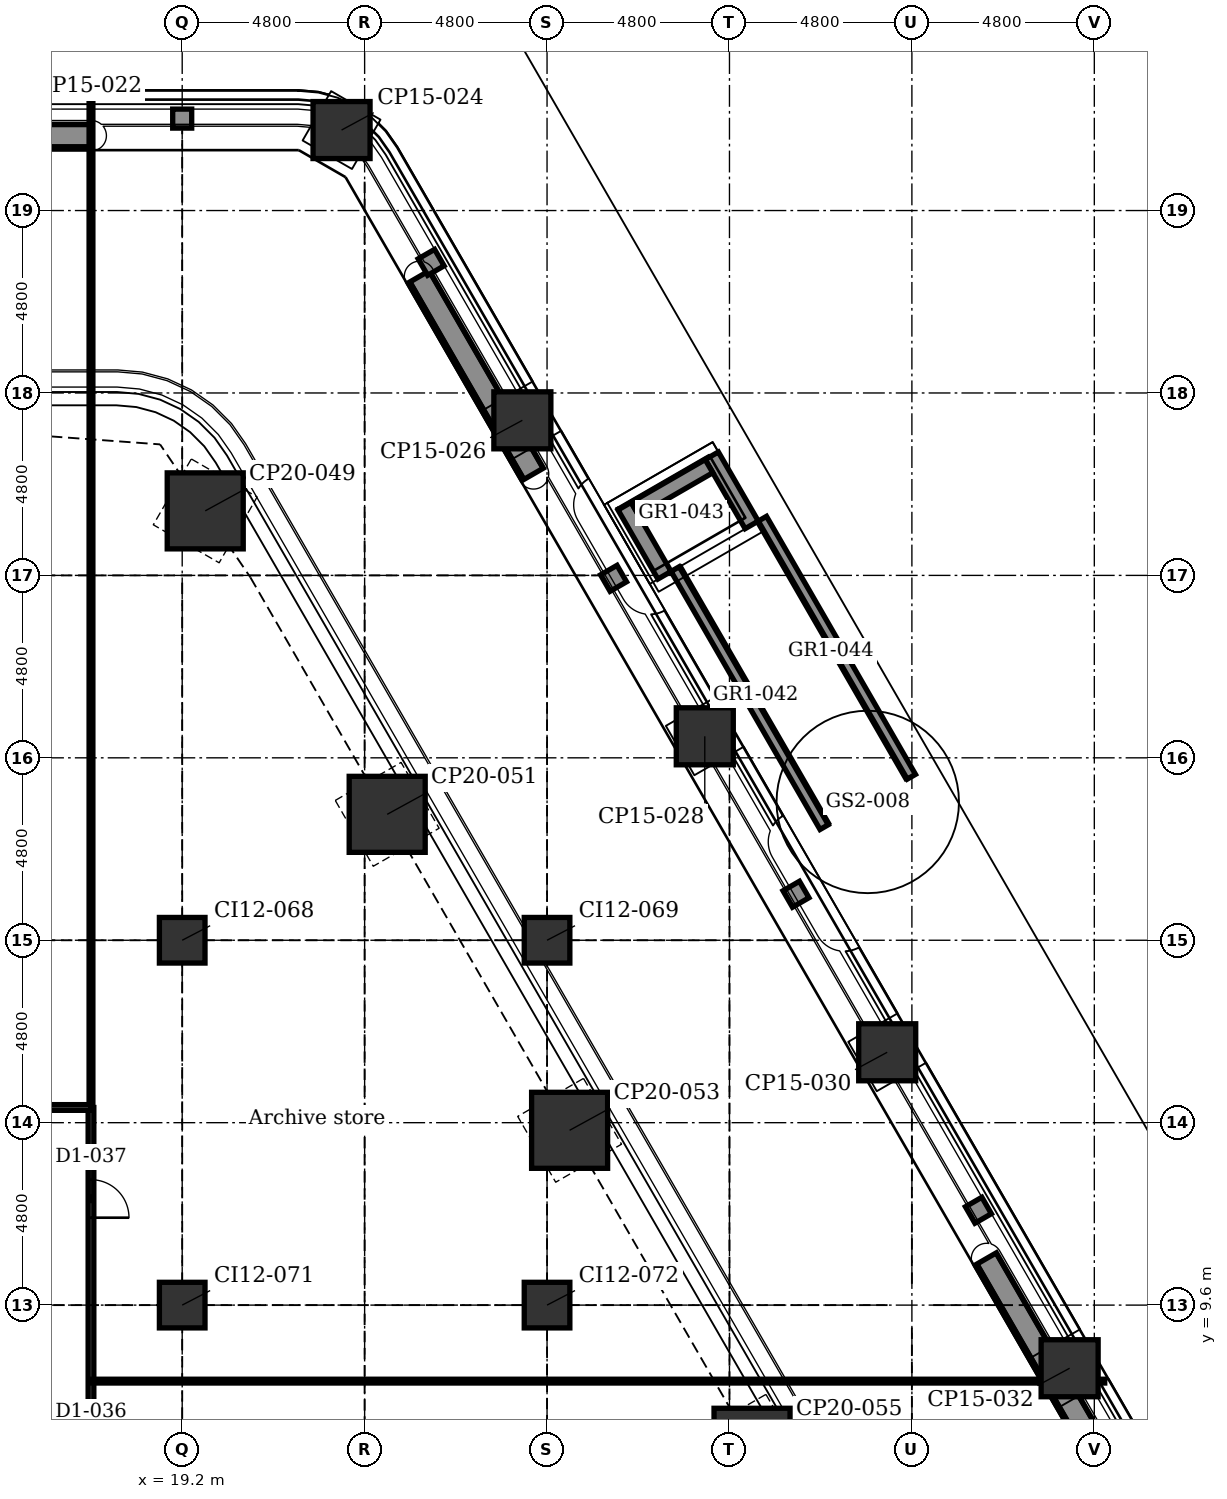
"""IFC4 building model, lengths in metres.
Left out: names, types, materials, properties, quantities, classifications, styles, units other than length and angle.
Written with IfcOpenShell. Run it as: python <this file> out.ifc"""

import sys

from ifc_helpers import new_model, si_unit, direction, frame, frame_2d, origin, origin_2d, place, context, subcontext, project, spatial, polyline, rectangle, outline, extrude, element, fill, save


model = new_model("IFC4")
c1 = context("Model", 3, precision=1e-05, world=origin(), true_north=direction((0.0, 1.0)))
c2 = subcontext(c1, "Body", "Model", "MODEL_VIEW")
j1 = project(units=[si_unit("LENGTHUNIT", "METRE"), si_unit("PLANEANGLEUNIT", "RADIAN")], contexts=[c1])
p1 = place(None, origin())
s1 = spatial("IfcSite", under=j1, at=p1, CompositionType="ELEMENT")
p2 = place(p1, origin())
s2 = spatial("IfcBuilding", under=s1, at=p2, CompositionType="ELEMENT")
p3 = place(p2, frame((0.0, 0.0, 12.4)))
s3 = spatial("IfcBuildingStorey", under=s2, at=p3, CompositionType="ELEMENT", Elevation=12.4)
for number, where, z_axis, x_axis in (
    (1, (23.393, 40.518, -0.3), (0.0, 0.0, 1.0), (0.5, 0.866, 0.0)),
    (2, (28.15, 32.88, -0.3), (0.0, 0.0, 1.0), (0.866, 0.5, 0.0)),
    (3, (32.95, 24.567, -0.3), (0.0, 0.0, 1.0), (0.866, 0.5, 0.0)),
    (4, (37.75, 16.253, -0.3), (0.0, 0.0, 1.0), (0.866, 0.5, 0.0)),
    (5, (42.551, 7.939, -0.3), (0.0, 0.0, 1.0), (0.866, 0.5, 0.0)),
):
    element("IfcColumn", number, at=place(p3, frame(where, z_axis=z_axis, x_axis=x_axis)), inside=s3, PredefinedType="COLUMN", context=c2, shape_type="SweptSolid", body=[
        extrude(rectangle(XDim=1.5, YDim=1.5, at=origin_2d()), origin(), (0.0, 0.0, 1.0), 5.05),
    ])
for number, where, z_axis, x_axis in (
    (6, (19.806, 30.498, -0.3), (0.0, 0.0, 1.0), (0.5, 0.866, 0.0)),
    (7, (24.594, 22.513, -0.3), (0.0, 0.0, 1.0), (0.866, 0.5, 0.0)),
    (8, (29.394, 14.199, -0.3), (0.0, 0.0, 1.0), (0.866, 0.5, 0.0)),
    (9, (34.194, 5.885, -0.3), (0.0, 0.0, 1.0), (0.866, 0.5, 0.0)),
):
    element("IfcColumn", number, at=place(p3, frame(where, z_axis=z_axis, x_axis=x_axis)), inside=s3, PredefinedType="COLUMN", context=c2, shape_type="SweptSolid", body=[
        extrude(rectangle(XDim=2.0, YDim=2.0, at=origin_2d()), origin(), (0.0, 0.0, 1.0), 5.05),
    ])
for number, where, z_axis, x_axis in (
    (10, (19.2, 9.6, -0.3), (0.0, 0.0, 1.0), (1.0, 0.0, 0.0)),
    (11, (19.2, 19.2, -0.3), (0.0, 0.0, 1.0), (1.0, 0.0, 0.0)),
    (12, (28.8, 9.6, -0.3), (0.0, 0.0, 1.0), (1.0, 0.0, 0.0)),
    (13, (28.8, 19.2, -0.3), (0.0, 0.0, 1.0), (1.0, 0.0, 0.0)),
):
    element("IfcColumn", number, at=place(p3, frame(where, z_axis=z_axis, x_axis=x_axis)), inside=s3, PredefinedType="COLUMN", context=c2, shape_type="SweptSolid", body=[
        extrude(rectangle(XDim=1.2, YDim=1.2, at=origin_2d()), origin(), (0.0, 0.0, 1.0), 5.05),
    ])
for number, where, z_axis, x_axis in (
    (14, (10.806, 40.369, 5.0), (0.0, 0.0, 1.0), (1.0, 0.0, 0.0)),
    (15, (40.364, 10.826, 5.0), (0.0, 0.0, 1.0), (0.5, -0.866, 0.0)),
    (16, (25.444, 36.668, 5.0), (0.0, 0.0, 1.0), (0.5, -0.866, 0.0)),
):
    element("IfcWall", number, at=place(p3, frame(where, z_axis=z_axis, x_axis=x_axis)), inside=s3, PredefinedType="USERDEFINED", context=c2, shape_type="SweptSolid", body=[
        extrude(rectangle(XDim=6.0, YDim=0.6, at=frame_2d((3.0, 0.0))), origin(), (0.0, 0.0, 1.0), 0.7),
    ])
p4 = place(p3, frame((36.091, 22.177, 0.0), z_axis=(0.0, 0.0, 1.0), x_axis=(-0.499997407846, 0.86602690036, 0.0)))
e17 = element("IfcWall", 17, at=p4, inside=s3, PredefinedType="SOLIDWALL", context=c2, shape_type="SweptSolid", body=[
    extrude(outline(polyline([(0.0, 0.0), (7.84, 0.0), (7.84, 5.1), (0.0, 0.272), (0.0, 0.0)])), frame((0.0, 0.125, 0.0), z_axis=(0.0, -1.0, 0.0), x_axis=(1.0, 0.0, 0.0)), (0.0, 0.0, 1.0), 0.25),
])
p5 = place(p3, frame((38.386, 23.502, 0.0), z_axis=(0.0, 0.0, 1.0), x_axis=(-0.500020763015, 0.866013415921, 0.0)))
e18 = element("IfcWall", 18, at=p5, inside=s3, PredefinedType="SOLIDWALL", context=c2, shape_type="SweptSolid", body=[
    extrude(outline(polyline([(0.0, 0.0), (7.84, 0.0), (7.84, 5.1), (0.0, 0.272), (0.0, 0.0)])), frame((0.0, 0.125, 0.0), z_axis=(0.0, -1.0, 0.0), x_axis=(1.0, 0.0, 0.0)), (0.0, 0.0, 1.0), 0.25),
])
p6 = place(p3, frame((33.135, 31.948, 0.45), z_axis=(0.0, 0.0, 1.0), x_axis=(0.49994051562, -0.866059744384, 0.0)))
e19 = element("IfcWall", 19, at=p6, inside=s3, PredefinedType="SOLIDWALL", context=c2, shape_type="SweptSolid", body=[
    extrude(rectangle(XDim=2.1, YDim=0.4, at=frame_2d((1.05, 0.0))), origin(), (0.0, 0.0, 1.0), 4.35),
])
p7 = place(p3, frame((30.84, 30.623, 0.45), z_axis=(0.0, 0.0, 1.0), x_axis=(0.500027713859, -0.866009402589, 0.0)))
e20 = element("IfcWall", 20, at=p7, inside=s3, PredefinedType="SOLIDWALL", context=c2, shape_type="SweptSolid", body=[
    extrude(rectangle(XDim=2.1, YDim=0.4, at=frame_2d((1.05, 0.0))), origin(), (0.0, 0.0, 1.0), 4.35),
])
p8 = place(p3, frame((31.113, 30.549, 0.45), z_axis=(0.0, 0.0, 1.0), x_axis=(0.866017533419, 0.500013631625, 0.0)))
e21 = element("IfcWall", 21, at=p8, inside=s3, PredefinedType="SOLIDWALL", context=c2, shape_type="SweptSolid", body=[
    extrude(rectangle(XDim=2.25, YDim=0.4, at=frame_2d((1.125, 0.0))), origin(), (0.0, 0.0, 1.0), 4.35),
])
p9 = place(p3, frame((18.95, 40.819, 0.0), z_axis=(0.0, 0.0, 1.0), x_axis=(1.0, 0.0, 0.0)))
e22 = element("IfcWall", 22, at=p9, inside=s3, PredefinedType="SOLIDWALL", context=c2, shape_type="SweptSolid", body=[
    extrude(rectangle(XDim=0.5, YDim=0.5, at=frame_2d((0.25, 0.0))), origin(), (0.0, 0.0, 1.0), 4.45),
])
for number, where, z_axis, x_axis in (
    (23, (25.625, 37.253, 0.0), (0.0, 0.0, 1.0), (0.5, -0.866, 0.0)),
    (24, (30.425, 28.939, 0.0), (0.0, 0.0, 1.0), (0.5, -0.866, 0.0)),
    (25, (35.225, 20.626, 0.0), (0.0, 0.0, 1.0), (0.5, -0.866, 0.0)),
):
    element("IfcWall", number, at=place(p3, frame(where, z_axis=z_axis, x_axis=x_axis)), inside=s3, PredefinedType="SOLIDWALL", context=c2, shape_type="SweptSolid", body=[
        extrude(rectangle(XDim=0.5, YDim=0.5, at=frame_2d((0.25, 0.0))), origin(), (0.0, 0.0, 1.0), 4.45),
    ])
p10 = place(p3, frame((40.025, 12.312, 0.0), z_axis=(0.0, 0.0, 1.0), x_axis=(0.499919672301, -0.866071776036, 0.0)))
e26 = element("IfcWall", 26, at=p10, inside=s3, PredefinedType="SOLIDWALL", context=c2, shape_type="SweptSolid", body=[
    extrude(rectangle(XDim=0.5, YDim=0.5, at=frame_2d((0.25, 0.0))), origin(), (0.0, 0.0, 1.0), 4.45),
])
p11 = place(p3, frame((16.8, 14.8, 0.0), z_axis=(0.0, 0.0, 1.0), x_axis=(0.0, 1.0, 0.0)))
e27 = element("IfcWall", 27, at=p11, inside=s3, PredefinedType="PARTITIONING", context=c2, shape_type="SweptSolid", body=[
    extrude(rectangle(XDim=26.599, YDim=0.1, at=frame_2d((13.3, 0.0))), origin(), (0.0, 0.0, 1.0), 4.7),
])
p12 = place(p3, frame((16.8, 3.95, 0.0), z_axis=(0.0, 0.0, 1.0), x_axis=(0.0, 1.0, 0.0)))
e28 = element("IfcWall", 28, at=p12, inside=s3, PredefinedType="PARTITIONING", context=c2, shape_type="SweptSolid", body=[
    extrude(rectangle(XDim=10.85, YDim=0.15, at=frame_2d((5.425, 0.0))), origin(), (0.0, 0.0, 1.0), 4.7),
])
p13 = place(p12, frame((1.25, 0.0, 0.0)))
e29 = element("IfcOpeningElement", 29, at=p13, cuts=e28, PredefinedType="OPENING", context=c2, shape_type="SweptSolid", body=[
    extrude(rectangle(XDim=1.0, YDim=2.1, at=frame_2d((0.5, 1.05))), frame((0.0, 0.085, 0.0), z_axis=(0.0, -1.0, 0.0), x_axis=(1.0, 0.0, 0.0)), (0.0, 0.0, 1.0), 0.17),
])
p14 = place(p12, frame((7.95, 0.0, 0.0)))
e30 = element("IfcOpeningElement", 30, at=p14, cuts=e28, PredefinedType="OPENING", context=c2, shape_type="SweptSolid", body=[
    extrude(rectangle(XDim=1.0, YDim=2.1, at=frame_2d((0.5, 1.05))), frame((0.0, 0.085, 0.0), z_axis=(0.0, -1.0, 0.0), x_axis=(1.0, 0.0, 0.0)), (0.0, 0.0, 1.0), 0.17),
])
p15 = place(p3, frame((16.8, 7.6, 0.0), z_axis=(0.0, 0.0, 1.0), x_axis=(1.0, 0.0, 0.0)))
e31 = element("IfcWall", 31, at=p15, inside=s3, PredefinedType="PARTITIONING", context=c2, shape_type="SweptSolid", body=[
    extrude(rectangle(XDim=26.674, YDim=0.1, at=frame_2d((13.337, 0.0))), origin(), (0.0, 0.0, 1.0), 4.7),
])
p16 = place(p3, frame((-16.8, 14.8, 0.0), z_axis=(0.0, 0.0, 1.0), x_axis=(1.0, 0.0, 0.0)))
e32 = element("IfcWall", 32, at=p16, inside=s3, PredefinedType="PARTITIONING", context=c2, shape_type="SweptSolid", body=[
    extrude(rectangle(XDim=33.6, YDim=0.15, at=frame_2d((16.8, 0.0))), origin(), (0.0, 0.0, 1.0), 4.7),
])
p17 = place(p16, frame((3.75, 0.0, 0.0)))
e33 = element("IfcOpeningElement", 33, at=p17, cuts=e32, PredefinedType="OPENING", context=c2, shape_type="SweptSolid", body=[
    extrude(rectangle(XDim=0.9, YDim=2.1, at=frame_2d((0.45, 1.05))), frame((0.0, 0.085, 0.0), z_axis=(0.0, -1.0, 0.0), x_axis=(1.0, 0.0, 0.0)), (0.0, 0.0, 1.0), 0.17),
])
p18 = place(p16, frame((6.75, 0.0, 0.0)))
e34 = element("IfcOpeningElement", 34, at=p18, cuts=e32, PredefinedType="OPENING", context=c2, shape_type="SweptSolid", body=[
    extrude(rectangle(XDim=0.9, YDim=2.1, at=frame_2d((0.45, 1.05))), frame((0.0, 0.085, 0.0), z_axis=(0.0, -1.0, 0.0), x_axis=(1.0, 0.0, 0.0)), (0.0, 0.0, 1.0), 0.17),
])
p19 = place(p16, frame((9.7, 0.0, 0.0)))
e35 = element("IfcOpeningElement", 35, at=p19, cuts=e32, PredefinedType="OPENING", context=c2, shape_type="SweptSolid", body=[
    extrude(rectangle(XDim=1.0, YDim=2.1, at=frame_2d((0.5, 1.05))), frame((0.0, 0.085, 0.0), z_axis=(0.0, -1.0, 0.0), x_axis=(1.0, 0.0, 0.0)), (0.0, 0.0, 1.0), 0.17),
])
p20 = place(p16, frame((16.3, 0.0, 0.0)))
e36 = element("IfcOpeningElement", 36, at=p20, cuts=e32, PredefinedType="OPENING", context=c2, shape_type="SweptSolid", body=[
    extrude(rectangle(XDim=1.0, YDim=2.1, at=frame_2d((0.5, 1.05))), frame((0.0, 0.085, 0.0), z_axis=(0.0, -1.0, 0.0), x_axis=(1.0, 0.0, 0.0)), (0.0, 0.0, 1.0), 0.17),
])
p21 = place(p16, frame((27.1, 0.0, 0.0)))
e37 = element("IfcOpeningElement", 37, at=p21, cuts=e32, PredefinedType="OPENING", context=c2, shape_type="SweptSolid", body=[
    extrude(rectangle(XDim=1.0, YDim=2.1, at=frame_2d((0.5, 1.05))), frame((0.0, 0.085, 0.0), z_axis=(0.0, -1.0, 0.0), x_axis=(1.0, 0.0, 0.0)), (0.0, 0.0, 1.0), 0.17),
])
p22 = place(p14, frame((1.0, 0.0, 0.0), z_axis=(0.0, 0.0, 1.0), x_axis=(-1.0, 0.0, 0.0)))
e38 = element("IfcDoor", 38, at=p22, inside=s3, OperationType="SINGLE_SWING_LEFT", PredefinedType="DOOR", context=c2, shape_type="SweptSolid", body=[
    extrude(rectangle(XDim=1.0, YDim=2.1, at=frame_2d((0.5, 1.05))), frame((0.0, 0.025, 0.0), z_axis=(0.0, -1.0, 0.0), x_axis=(1.0, 0.0, 0.0)), (0.0, 0.0, 1.0), 0.05),
])
fill(e30, e38)
save(model, sys.argv[1])
